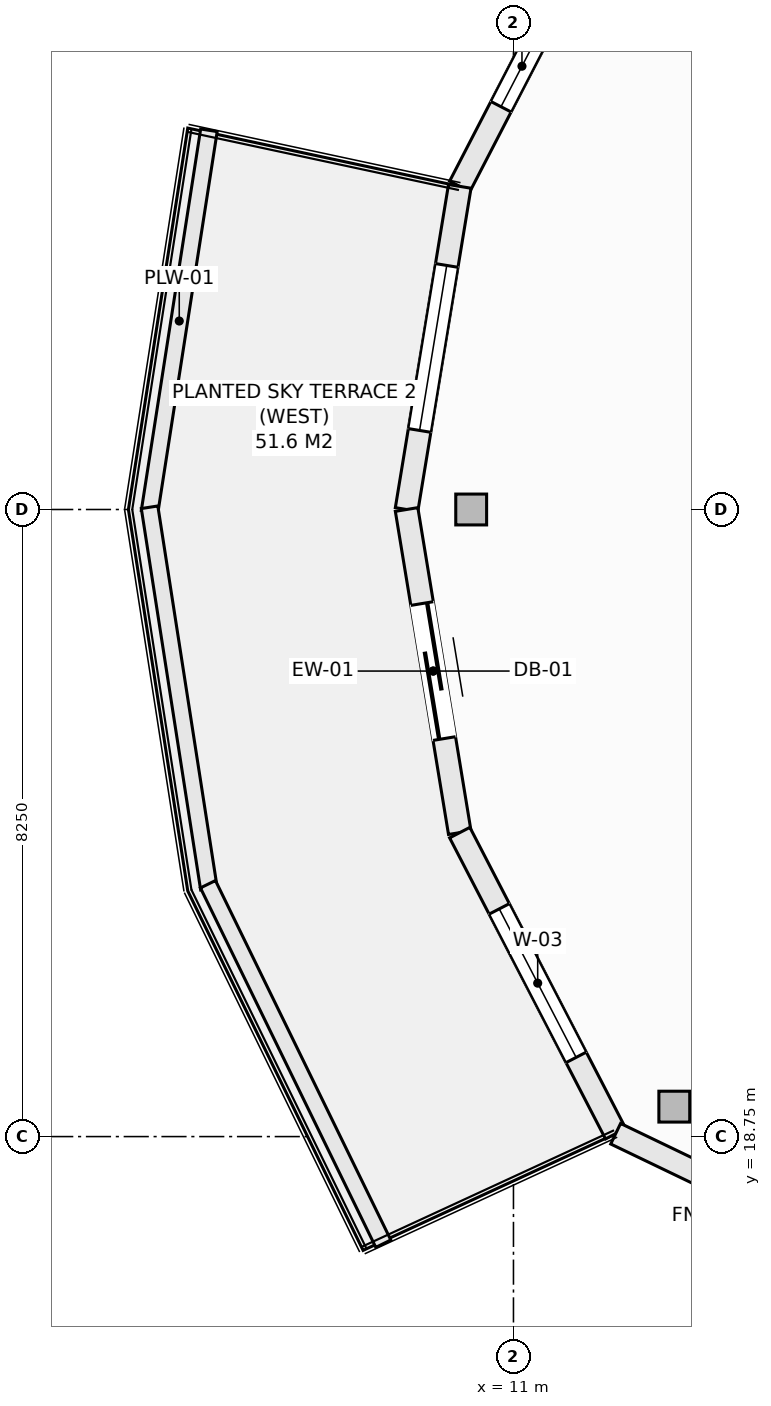
"""IFC4 building model, lengths in metres.
Left out: names, types, materials, properties, quantities, classifications, styles, units other than length and angle.
Written with IfcOpenShell. Run it as: python <this file> out.ifc"""

import sys

from ifc_helpers import new_model, si_unit, direction, frame, frame_2d, origin, origin_2d, place, context, subcontext, project, spatial, rectangle, hollow_rectangle, extrude, element, fill, save


model = new_model("IFC4")
c1 = context("Model", 3, precision=1e-05, world=origin(), true_north=direction((0.0, 1.0)))
c2 = subcontext(c1, "Body", "Model", "MODEL_VIEW")
j1 = project(units=[si_unit("LENGTHUNIT", "METRE"), si_unit("PLANEANGLEUNIT", "RADIAN")], contexts=[c1])
p1 = place(None, origin())
s1 = spatial("IfcSite", under=j1, at=p1, CompositionType="ELEMENT")
p2 = place(p1, origin())
s2 = spatial("IfcBuilding", under=s1, at=p2, CompositionType="ELEMENT")
p3 = place(p2, frame((0.0, 0.0, 269.0)))
s3 = spatial("IfcBuildingStorey", under=s2, at=p3, CompositionType="ELEMENT", Elevation=269.0)
for number, where, z_axis, x_axis in (
    (1, (10.444, 27.0, -0.27), (0.0, 0.0, 1.0), (1.0, 0.0, 0.0)),
    (2, (13.116, 19.144, -0.27), (0.0, 0.0, 1.0), (1.0, 0.0, 0.0)),
):
    element("IfcColumn", number, at=place(p3, frame(where, z_axis=z_axis, x_axis=x_axis)), inside=s3, PredefinedType="COLUMN", context=c2, shape_type="SweptSolid", body=[
        extrude(hollow_rectangle(XDim=0.406, YDim=0.406, WallThickness=0.016, at=origin_2d()), origin(), (0.0, 0.0, 1.0), 3.3),
    ])
p4 = place(p3, frame((10.293, 31.251, 0.0), z_axis=(0.0, 0.0, 1.0), x_axis=(0.459801070243, 0.888021945564, 0.0)))
e3 = element("IfcWall", 3, at=p4, inside=s3, PredefinedType="SOLIDWALL", context=c2, shape_type="SweptSolid", body=[
    extrude(rectangle(XDim=4.461, YDim=0.3, at=frame_2d((2.23, 0.0))), origin(), (0.0, 0.0, 1.0), 2.605),
])
p5 = place(p4, frame((1.18, 0.0, 0.72)))
e4 = element("IfcOpeningElement", 4, at=p5, cuts=e3, PredefinedType="OPENING", context=c2, shape_type="SweptSolid", body=[
    extrude(rectangle(XDim=1.2, YDim=1.65, at=frame_2d((0.6, 0.825))), frame((0.0, 0.16, 0.0), z_axis=(0.0, -1.0, 0.0), x_axis=(1.0, 0.0, 0.0)), (0.0, 0.0, 1.0), 0.32),
])
p6 = place(p3, frame((9.594, 27.0, 0.0), z_axis=(0.0, 0.0, 1.0), x_axis=(0.162404622434, 0.98672424649, 0.0)))
e5 = element("IfcWall", 5, at=p6, inside=s3, PredefinedType="SOLIDWALL", context=c2, shape_type="SweptSolid", body=[
    extrude(rectangle(XDim=4.308, YDim=0.3, at=frame_2d((2.154, 0.0))), origin(), (0.0, 0.0, 1.0), 2.605),
])
p7 = place(p6, frame((1.054, 0.0, 0.72)))
e6 = element("IfcOpeningElement", 6, at=p7, cuts=e5, PredefinedType="OPENING", context=c2, shape_type="SweptSolid", body=[
    extrude(rectangle(XDim=2.2, YDim=1.65, at=frame_2d((1.1, 0.825))), frame((0.0, 0.16, 0.0), z_axis=(0.0, -1.0, 0.0), x_axis=(1.0, 0.0, 0.0)), (0.0, 0.0, 1.0), 0.32),
])
p8 = place(p3, frame((9.594, 27.0, 0.0), z_axis=(0.0, 0.0, 1.0), x_axis=(0.162404622434, -0.98672424649, 0.0)))
e7 = element("IfcWall", 7, at=p8, inside=s3, PredefinedType="SOLIDWALL", context=c2, shape_type="SweptSolid", body=[
    extrude(rectangle(XDim=4.308, YDim=0.3, at=frame_2d((2.154, 0.0))), origin(), (0.0, 0.0, 1.0), 2.605),
])
p9 = place(p8, frame((1.254, 0.0, 0.0)))
e8 = element("IfcOpeningElement", 8, at=p9, cuts=e7, PredefinedType="OPENING", context=c2, shape_type="SweptSolid", body=[
    extrude(rectangle(XDim=1.8, YDim=2.25, at=frame_2d((0.9, 1.125))), frame((0.0, 0.16, 0.0), z_axis=(0.0, -1.0, 0.0), x_axis=(1.0, 0.0, 0.0)), (0.0, 0.0, 1.0), 0.32),
])
p10 = place(p3, frame((10.293, 22.749, 0.0), z_axis=(0.0, 0.0, 1.0), x_axis=(0.459801070243, -0.888021945564, 0.0)))
e9 = element("IfcWall", 9, at=p10, inside=s3, PredefinedType="SOLIDWALL", context=c2, shape_type="SweptSolid", body=[
    extrude(rectangle(XDim=4.461, YDim=0.3, at=frame_2d((2.23, 0.0))), origin(), (0.0, 0.0, 1.0), 2.605),
])
p11 = place(p10, frame((1.13, 0.0, 0.72)))
e10 = element("IfcOpeningElement", 10, at=p11, cuts=e9, PredefinedType="OPENING", context=c2, shape_type="SweptSolid", body=[
    extrude(rectangle(XDim=2.2, YDim=1.65, at=frame_2d((1.1, 0.825))), frame((0.0, 0.16, 0.0), z_axis=(0.0, -1.0, 0.0), x_axis=(1.0, 0.0, 0.0)), (0.0, 0.0, 1.0), 0.32),
])
p12 = place(p3, frame((12.344, 18.788, 0.0), z_axis=(0.0, 0.0, 1.0), x_axis=(0.901346013132, -0.433099716706, 0.0)))
e11 = element("IfcWall", 11, at=p12, inside=s3, PredefinedType="SOLIDWALL", context=c2, shape_type="SweptSolid", body=[
    extrude(rectangle(XDim=4.994, YDim=0.3, at=frame_2d((2.497, 0.0))), origin(), (0.0, 0.0, 1.0), 2.605),
])
p13 = place(p12, frame((1.397, 0.0, 0.72)))
e12 = element("IfcOpeningElement", 12, at=p13, cuts=e11, PredefinedType="OPENING", context=c2, shape_type="SweptSolid", body=[
    extrude(rectangle(XDim=2.2, YDim=1.65, at=frame_2d((1.1, 0.825))), frame((0.0, 0.16, 0.0), z_axis=(0.0, -1.0, 0.0), x_axis=(1.0, 0.0, 0.0)), (0.0, 0.0, 1.0), 0.32),
])
for number, where, z_axis, x_axis in (
    (13, (6.212, 26.971, 0.0), (0.0, 0.0, 1.0), (0.154, 0.988, 0.0)),
    (14, (6.212, 27.029, 0.0), (0.0, 0.0, 1.0), (0.154, -0.988, 0.0)),
):
    element("IfcWall", number, at=place(p3, frame(where, z_axis=z_axis, x_axis=x_axis)), inside=s3, PredefinedType="PARAPET", context=c2, shape_type="SweptSolid", body=[
        extrude(rectangle(XDim=5.078, YDim=0.22, at=frame_2d((2.539, 0.0))), origin(), (0.0, 0.0, 1.0), 0.52),
    ])
p14 = place(p3, frame((6.98, 22.07, 0.0), z_axis=(0.0, 0.0, 1.0), x_axis=(0.438469339137, -0.898746148051, 0.0)))
e15 = element("IfcWall", 15, at=p14, inside=s3, PredefinedType="PARAPET", context=c2, shape_type="SweptSolid", body=[
    extrude(rectangle(XDim=5.262, YDim=0.22, at=frame_2d((2.631, 0.0))), origin(), (0.0, 0.0, 1.0), 0.52),
])
p15 = place(p5, origin())
e16 = element("IfcWindow", 16, at=p15, inside=s3, PartitioningType="SINGLE_PANEL", PredefinedType="WINDOW", context=c2, shape_type="SweptSolid", body=[
    extrude(rectangle(XDim=1.2, YDim=1.65, at=frame_2d((0.6, 0.825))), frame((0.0, 0.03, 0.0), z_axis=(0.0, -1.0, 0.0), x_axis=(1.0, 0.0, 0.0)), (0.0, 0.0, 1.0), 0.06),
])
fill(e4, e16)
p16 = place(p7, origin())
e17 = element("IfcWindow", 17, at=p16, inside=s3, PartitioningType="SINGLE_PANEL", PredefinedType="WINDOW", context=c2, shape_type="SweptSolid", body=[
    extrude(rectangle(XDim=2.2, YDim=1.65, at=frame_2d((1.1, 0.825))), frame((0.0, 0.03, 0.0), z_axis=(0.0, -1.0, 0.0), x_axis=(1.0, 0.0, 0.0)), (0.0, 0.0, 1.0), 0.06),
])
fill(e6, e17)
p17 = place(p9, frame((1.8, 0.0, 0.0), z_axis=(0.0, 0.0, 1.0), x_axis=(-1.0, 0.0, 0.0)))
e18 = element("IfcDoor", 18, at=p17, inside=s3, OperationType="SLIDING_TO_LEFT", PredefinedType="DOOR", context=c2, shape_type="SweptSolid", body=[
    extrude(rectangle(XDim=1.8, YDim=2.25, at=frame_2d((0.9, 1.125))), frame((0.0, 0.025, 0.0), z_axis=(0.0, -1.0, 0.0), x_axis=(1.0, 0.0, 0.0)), (0.0, 0.0, 1.0), 0.05),
])
fill(e8, e18)
p18 = place(p11, origin())
e19 = element("IfcWindow", 19, at=p18, inside=s3, PartitioningType="SINGLE_PANEL", PredefinedType="WINDOW", context=c2, shape_type="SweptSolid", body=[
    extrude(rectangle(XDim=2.2, YDim=1.65, at=frame_2d((1.1, 0.825))), frame((0.0, 0.03, 0.0), z_axis=(0.0, -1.0, 0.0), x_axis=(1.0, 0.0, 0.0)), (0.0, 0.0, 1.0), 0.06),
])
fill(e10, e19)
save(model, sys.argv[1])
